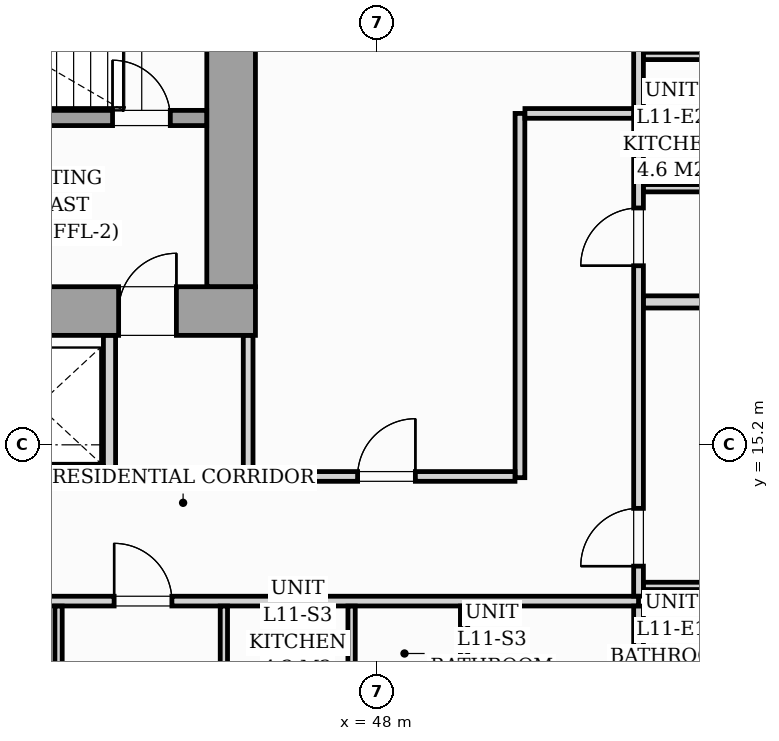
"""IFC4 building model, lengths in metres.
Left out: names, types, materials, properties, quantities, classifications, styles, units other than length and angle.
Written with IfcOpenShell. Run it as: python <this file> out.ifc"""

import sys

from ifc_helpers import new_model, si_unit, direction, frame, frame_2d, origin, origin_2d, place, context, subcontext, project, spatial, rectangle, i_section, extrude, source, transform, mapped, element, fill, save


model = new_model("IFC4")
c1 = context("Model", 3, precision=1e-05, world=origin(), true_north=direction((0.0, 1.0)))
c2 = subcontext(c1, "Body", "Model", "MODEL_VIEW")
j1 = project(units=[si_unit("LENGTHUNIT", "METRE"), si_unit("PLANEANGLEUNIT", "RADIAN")], contexts=[c1])
p1 = place(None, origin())
s1 = spatial("IfcSite", under=j1, at=p1, CompositionType="ELEMENT")
p2 = place(p1, origin())
s2 = spatial("IfcBuilding", under=s1, at=p2, CompositionType="ELEMENT")
p3 = place(p2, frame((0.0, 0.0, 42.2)))
s3 = spatial("IfcBuildingStorey", under=s2, at=p3, CompositionType="ELEMENT", Elevation=42.2)
m1 = source(origin(), c2, "Body", "SweptSolid", [
    extrude(i_section(OverallWidth=0.437, OverallDepth=0.514, WebThickness=0.061, FlangeThickness=0.097, FilletRadius=0.018, at=origin_2d()), origin(), (0.0, 0.0, 1.0), 3.196),
])
p4 = place(p3, frame((45.6, 17.4, 0.002), z_axis=(0.0, 0.0, 1.0), x_axis=(1.0, 0.0, 0.0)))
e1 = element("IfcColumn", 1, at=p4, inside=s3, PredefinedType="PILASTER", context=c2, shape_type="MappedRepresentation", body=[
    mapped(m1, transform((0.0, 0.0, 0.0), scale=1.0)),
])
p5 = place(p3, frame((26.0, 17.4, 0.0), z_axis=(0.0, 0.0, 1.0), x_axis=(1.0, 0.0, 0.0)))
e2 = element("IfcWall", 2, at=p5, inside=s3, PredefinedType="SHEAR", context=c2, shape_type="SweptSolid", body=[
    extrude(rectangle(XDim=20.0, YDim=0.8, at=frame_2d((10.0, 0.0))), origin(), (0.0, 0.0, 1.0), 3.2),
])
p6 = place(p5, frame((1.15, 0.0, 0.0)))
e3 = element("IfcOpeningElement", 3, at=p6, cuts=e2, PredefinedType="OPENING", context=c2, shape_type="SweptSolid", body=[
    extrude(rectangle(XDim=0.95, YDim=2.06, at=frame_2d((0.475, 1.03))), frame((0.0, 0.41, 0.0), z_axis=(0.0, -1.0, 0.0), x_axis=(1.0, 0.0, 0.0)), (0.0, 0.0, 1.0), 0.82),
])
p7 = place(p5, frame((9.58, 0.0, 0.0)))
e4 = element("IfcOpeningElement", 4, at=p7, cuts=e2, PredefinedType="OPENING", context=c2, shape_type="SweptSolid", body=[
    extrude(rectangle(XDim=0.85, YDim=2.0, at=frame_2d((0.425, 1.0))), frame((0.0, 0.41, 0.0), z_axis=(0.0, -1.0, 0.0), x_axis=(1.0, 0.0, 0.0)), (0.0, 0.0, 1.0), 0.82),
])
p8 = place(p5, frame((17.75, 0.0, 0.0)))
e5 = element("IfcOpeningElement", 5, at=p8, cuts=e2, PredefinedType="OPENING", context=c2, shape_type="SweptSolid", body=[
    extrude(rectangle(XDim=0.95, YDim=2.06, at=frame_2d((0.475, 1.03))), frame((0.0, 0.41, 0.0), z_axis=(0.0, -1.0, 0.0), x_axis=(1.0, 0.0, 0.0)), (0.0, 0.0, 1.0), 0.82),
])
p9 = place(p3, frame((45.6, 17.802, 0.0), z_axis=(0.0, 0.0, 1.0), x_axis=(0.0, 1.0, 0.0)))
e6 = element("IfcWall", 6, at=p9, inside=s3, PredefinedType="SHEAR", context=c2, shape_type="SweptSolid", body=[
    extrude(rectangle(XDim=5.796, YDim=0.8, at=frame_2d((2.898, 0.0))), origin(), (0.0, 0.0, 1.0), 3.2),
])
p10 = place(p3, frame((37.05, 20.575, 0.0), z_axis=(0.0, 0.0, 1.0), x_axis=(1.0, 0.0, 0.0)))
e7 = element("IfcWall", 7, at=p10, inside=s3, PredefinedType="SOLIDWALL", context=c2, shape_type="SweptSolid", body=[
    extrude(rectangle(XDim=8.148, YDim=0.25, at=frame_2d((4.074, 0.0))), origin(), (0.0, 0.0, 1.0), 3.2),
])
p11 = place(p10, frame((6.6, 0.0, 0.0)))
e8 = element("IfcOpeningElement", 8, at=p11, cuts=e7, PredefinedType="OPENING", context=c2, shape_type="SweptSolid", body=[
    extrude(rectangle(XDim=0.95, YDim=2.06, at=frame_2d((0.475, 1.03))), frame((0.0, 0.135, 0.0), z_axis=(0.0, -1.0, 0.0), x_axis=(1.0, 0.0, 0.0)), (0.0, 0.0, 1.0), 0.27),
])
p12 = place(p3, frame((43.6, 14.75, 0.0), z_axis=(0.0, 0.0, 1.0), x_axis=(0.0, 1.0, 0.0)))
e9 = element("IfcWall", 9, at=p12, inside=s3, PredefinedType="PARTITIONING", context=c2, shape_type="SweptSolid", body=[
    extrude(rectangle(XDim=2.248, YDim=0.2, at=frame_2d((1.124, 0.0))), origin(), (0.0, 0.0, 1.0), 2.94),
])
p13 = place(p3, frame((41.352, 14.75, 0.0), z_axis=(0.0, 0.0, 1.0), x_axis=(1.0, 0.0, 0.0)))
e10 = element("IfcWall", 10, at=p13, inside=s3, PredefinedType="PARTITIONING", context=c2, shape_type="SweptSolid", body=[
    extrude(rectangle(XDim=2.146, YDim=0.2, at=frame_2d((1.073, 0.0))), origin(), (0.0, 0.0, 1.0), 2.94),
])
p14 = place(p3, frame((15.2, 12.63, 0.0), z_axis=(0.0, 0.0, 1.0), x_axis=(1.0, 0.0, 0.0)))
e11 = element("IfcWall", 11, at=p14, inside=s3, PredefinedType="PARTITIONING", context=c2, shape_type="SweptSolid", body=[
    extrude(rectangle(XDim=37.1, YDim=0.16, at=frame_2d((18.55, 0.0))), origin(), (0.0, 0.0, 1.0), 2.94),
])
p15 = place(p14, frame((1.572, 0.0, 0.0)))
e12 = element("IfcOpeningElement", 12, at=p15, cuts=e11, PredefinedType="OPENING", context=c2, shape_type="SweptSolid", body=[
    extrude(rectangle(XDim=0.95, YDim=2.06, at=frame_2d((0.475, 1.03))), frame((0.0, 0.09, 0.0), z_axis=(0.0, -1.0, 0.0), x_axis=(1.0, 0.0, 0.0)), (0.0, 0.0, 1.0), 0.18),
])
p16 = place(p14, frame((14.877, 0.0, 0.0)))
e13 = element("IfcOpeningElement", 13, at=p16, cuts=e11, PredefinedType="OPENING", context=c2, shape_type="SweptSolid", body=[
    extrude(rectangle(XDim=0.95, YDim=2.06, at=frame_2d((0.475, 1.03))), frame((0.0, 0.09, 0.0), z_axis=(0.0, -1.0, 0.0), x_axis=(1.0, 0.0, 0.0)), (0.0, 0.0, 1.0), 0.18),
])
p17 = place(p14, frame((28.476, 0.0, 0.0)))
e14 = element("IfcOpeningElement", 14, at=p17, cuts=e11, PredefinedType="OPENING", context=c2, shape_type="SweptSolid", body=[
    extrude(rectangle(XDim=0.95, YDim=2.06, at=frame_2d((0.475, 1.03))), frame((0.0, 0.09, 0.0), z_axis=(0.0, -1.0, 0.0), x_axis=(1.0, 0.0, 0.0)), (0.0, 0.0, 1.0), 0.18),
])
p18 = place(p3, frame((52.3, 2.962, 0.0), z_axis=(0.0, 0.0, 1.0), x_axis=(0.0, 1.0, 0.0)))
e15 = element("IfcWall", 15, at=p18, inside=s3, PredefinedType="PARTITIONING", context=c2, shape_type="SweptSolid", body=[
    extrude(rectangle(XDim=9.586, YDim=0.16, at=frame_2d((4.793, 0.0))), origin(), (0.0, 0.0, 1.0), 2.94),
])
p19 = place(p3, frame((52.3, 12.712, 0.0), z_axis=(0.0, 0.0, 1.0), x_axis=(0.0, 1.0, 0.0)))
e16 = element("IfcWall", 16, at=p19, inside=s3, PredefinedType="PARTITIONING", context=c2, shape_type="SweptSolid", body=[
    extrude(rectangle(XDim=14.726, YDim=0.16, at=frame_2d((7.363, 0.0))), origin(), (0.0, 0.0, 1.0), 2.94),
])
p20 = place(p19, frame((0.493, 0.0, 0.0)))
e17 = element("IfcOpeningElement", 17, at=p20, cuts=e16, PredefinedType="OPENING", context=c2, shape_type="SweptSolid", body=[
    extrude(rectangle(XDim=0.95, YDim=2.06, at=frame_2d((0.475, 1.03))), frame((0.0, 0.09, 0.0), z_axis=(0.0, -1.0, 0.0), x_axis=(1.0, 0.0, 0.0)), (0.0, 0.0, 1.0), 0.18),
])
p21 = place(p19, frame((5.433, 0.0, 0.0)))
e18 = element("IfcOpeningElement", 18, at=p21, cuts=e16, PredefinedType="OPENING", context=c2, shape_type="SweptSolid", body=[
    extrude(rectangle(XDim=0.95, YDim=2.06, at=frame_2d((0.475, 1.03))), frame((0.0, 0.09, 0.0), z_axis=(0.0, -1.0, 0.0), x_axis=(1.0, 0.0, 0.0)), (0.0, 0.0, 1.0), 0.18),
])
p22 = place(p3, frame((49.431, 2.962, 0.0), z_axis=(0.0, 0.0, 1.0), x_axis=(0.0, 1.0, 0.0)))
e19 = element("IfcWall", 19, at=p22, inside=s3, PredefinedType="PARTITIONING", context=c2, shape_type="SweptSolid", body=[
    extrude(rectangle(XDim=9.586, YDim=0.12, at=frame_2d((4.793, 0.0))), origin(), (0.0, 0.0, 1.0), 2.94),
])
p23 = place(p22, frame((6.318, 0.0, 0.0)))
e20 = element("IfcOpeningElement", 20, at=p23, cuts=e19, PredefinedType="OPENING", context=c2, shape_type="SweptSolid", body=[
    extrude(rectangle(XDim=0.9, YDim=2.05, at=frame_2d((0.45, 1.025))), frame((0.0, 0.07, 0.0), z_axis=(0.0, -1.0, 0.0), x_axis=(1.0, 0.0, 0.0)), (0.0, 0.0, 1.0), 0.14),
])
for number, where, z_axis, x_axis in (
    (21, (47.581, 10.442, 0.0), (0.0, 0.0, 1.0), (0.0, 1.0, 0.0)),
    (22, (45.481, 10.442, 0.0), (0.0, 0.0, 1.0), (0.0, 1.0, 0.0)),
):
    element("IfcWall", number, at=place(p3, frame(where, z_axis=z_axis, x_axis=x_axis)), inside=s3, PredefinedType="PARTITIONING", context=c2, shape_type="SweptSolid", body=[
        extrude(rectangle(XDim=2.106, YDim=0.12, at=frame_2d((1.053, 0.0))), origin(), (0.0, 0.0, 1.0), 2.94),
    ])
p24 = place(p3, frame((42.762, 2.962, 0.0), z_axis=(0.0, 0.0, 1.0), x_axis=(0.0, 1.0, 0.0)))
e23 = element("IfcWall", 23, at=p24, inside=s3, PredefinedType="PARTITIONING", context=c2, shape_type="SweptSolid", body=[
    extrude(rectangle(XDim=9.586, YDim=0.12, at=frame_2d((4.793, 0.0))), origin(), (0.0, 0.0, 1.0), 2.94),
])
p25 = place(p24, frame((4.358, 0.0, 0.0)))
e24 = element("IfcOpeningElement", 24, at=p25, cuts=e23, PredefinedType="OPENING", context=c2, shape_type="SweptSolid", body=[
    extrude(rectangle(XDim=0.85, YDim=2.05, at=frame_2d((0.425, 1.025))), frame((0.0, 0.07, 0.0), z_axis=(0.0, -1.0, 0.0), x_axis=(1.0, 0.0, 0.0)), (0.0, 0.0, 1.0), 0.14),
])
p26 = place(p3, frame((52.382, 17.55, 0.0), z_axis=(0.0, 0.0, 1.0), x_axis=(1.0, 0.0, 0.0)))
e25 = element("IfcWall", 25, at=p26, inside=s3, PredefinedType="PARTITIONING", context=c2, shape_type="SweptSolid", body=[
    extrude(rectangle(XDim=7.338, YDim=0.2, at=frame_2d((3.669, 0.0))), origin(), (0.0, 0.0, 1.0), 2.94),
])
for number, where, z_axis, x_axis in (
    (26, (52.382, 12.88, 0.0), (0.0, 0.0, 1.0), (1.0, 0.0, 0.0)),
    (27, (52.382, 21.595, 0.0), (0.0, 0.0, 1.0), (1.0, 0.0, 0.0)),
    (28, (52.382, 19.42, 0.0), (0.0, 0.0, 1.0), (1.0, 0.0, 0.0)),
):
    element("IfcWall", number, at=place(p3, frame(where, z_axis=z_axis, x_axis=x_axis)), inside=s3, PredefinedType="PARTITIONING", context=c2, shape_type="SweptSolid", body=[
        extrude(rectangle(XDim=2.256, YDim=0.12, at=frame_2d((1.128, 0.0))), origin(), (0.0, 0.0, 1.0), 2.94),
    ])
p27 = place(p3, frame((50.35, 14.66, 0.0), z_axis=(0.0, 0.0, 1.0), x_axis=(0.0, 1.0, 0.0)))
e29 = element("IfcWall", 29, at=p27, inside=s3, PredefinedType="PARTITIONING", context=c2, shape_type="SweptSolid", body=[
    extrude(rectangle(XDim=5.99, YDim=0.16, at=frame_2d((2.995, 0.0))), origin(), (0.0, 0.0, 1.0), 2.94),
])
p28 = place(p3, frame((50.432, 20.65, 0.0), z_axis=(0.0, 0.0, 1.0), x_axis=(1.0, 0.0, 0.0)))
e30 = element("IfcWall", 30, at=p28, inside=s3, PredefinedType="PARTITIONING", context=c2, shape_type="SweptSolid", body=[
    extrude(rectangle(XDim=1.786, YDim=0.16, at=frame_2d((0.893, 0.0))), origin(), (0.0, 0.0, 1.0), 2.94),
])
p29 = place(p3, frame((45.84, 14.68, 0.0), z_axis=(0.0, 0.0, 1.0), x_axis=(1.0, 0.0, 0.0)))
e31 = element("IfcWall", 31, at=p29, inside=s3, PredefinedType="PARTITIONING", context=c2, shape_type="SweptSolid", body=[
    extrude(rectangle(XDim=4.428, YDim=0.16, at=frame_2d((2.214, 0.0))), origin(), (0.0, 0.0, 1.0), 2.94),
])
p30 = place(p29, frame((1.84, 0.0, 0.0)))
e32 = element("IfcOpeningElement", 32, at=p30, cuts=e31, PredefinedType="OPENING", context=c2, shape_type="SweptSolid", body=[
    extrude(rectangle(XDim=0.95, YDim=2.06, at=frame_2d((0.475, 1.03))), frame((0.0, 0.09, 0.0), z_axis=(0.0, -1.0, 0.0), x_axis=(1.0, 0.0, 0.0)), (0.0, 0.0, 1.0), 0.18),
])
p31 = place(p3, frame((45.88, 14.762, 0.0), z_axis=(0.0, 0.0, 1.0), x_axis=(0.0, 1.0, 0.0)))
e33 = element("IfcWall", 33, at=p31, inside=s3, PredefinedType="PARTITIONING", context=c2, shape_type="SweptSolid", body=[
    extrude(rectangle(XDim=2.236, YDim=0.16, at=frame_2d((1.118, 0.0))), origin(), (0.0, 0.0, 1.0), 2.94),
])
m2 = source(origin(), c2, "Body", "SweptSolid", [
    extrude(rectangle(XDim=0.95, YDim=2.06, at=frame_2d((0.475, 1.03))), frame((0.0, 0.025, 0.0), z_axis=(0.0, -1.0, 0.0), x_axis=(1.0, 0.0, 0.0)), (0.0, 0.0, 1.0), 0.05),
])
p32 = place(p8, origin())
e34 = element("IfcDoor", 34, at=p32, inside=s3, OperationType="SINGLE_SWING_RIGHT", PredefinedType="DOOR", context=c2, shape_type="MappedRepresentation", body=[
    mapped(m2, transform((0.0, 0.0, 0.0), scale=1.0)),
])
fill(e5, e34)
p33 = place(p11, origin())
e35 = element("IfcDoor", 35, at=p33, inside=s3, OperationType="SINGLE_SWING_LEFT", PredefinedType="DOOR", context=c2, shape_type="MappedRepresentation", body=[
    mapped(m2, transform((0.0, 0.0, 0.0), scale=1.0)),
])
fill(e8, e35)
m3 = source(origin(), c2, "Body", "SweptSolid", [
    extrude(rectangle(XDim=0.95, YDim=2.06, at=frame_2d((0.475, 1.03))), frame((0.0, 0.025, 0.0), z_axis=(0.0, -1.0, 0.0), x_axis=(1.0, 0.0, 0.0)), (0.0, 0.0, 1.0), 0.05),
])
p34 = place(p17, origin())
e36 = element("IfcDoor", 36, at=p34, inside=s3, OperationType="SINGLE_SWING_LEFT", PredefinedType="DOOR", context=c2, shape_type="MappedRepresentation", body=[
    mapped(m3, transform((0.0, 0.0, 0.0), scale=1.0)),
])
fill(e14, e36)
p35 = place(p20, origin())
e37 = element("IfcDoor", 37, at=p35, inside=s3, OperationType="SINGLE_SWING_LEFT", PredefinedType="DOOR", context=c2, shape_type="MappedRepresentation", body=[
    mapped(m3, transform((0.0, 0.0, 0.0), scale=1.0)),
])
fill(e17, e37)
p36 = place(p21, origin())
e38 = element("IfcDoor", 38, at=p36, inside=s3, OperationType="SINGLE_SWING_LEFT", PredefinedType="DOOR", context=c2, shape_type="MappedRepresentation", body=[
    mapped(m3, transform((0.0, 0.0, 0.0), scale=1.0)),
])
fill(e18, e38)
p37 = place(p30, origin())
e39 = element("IfcDoor", 39, at=p37, inside=s3, OperationType="SINGLE_SWING_RIGHT", PredefinedType="DOOR", context=c2, shape_type="MappedRepresentation", body=[
    mapped(m3, transform((0.0, 0.0, 0.0), scale=1.0)),
])
fill(e32, e39)
save(model, sys.argv[1])
